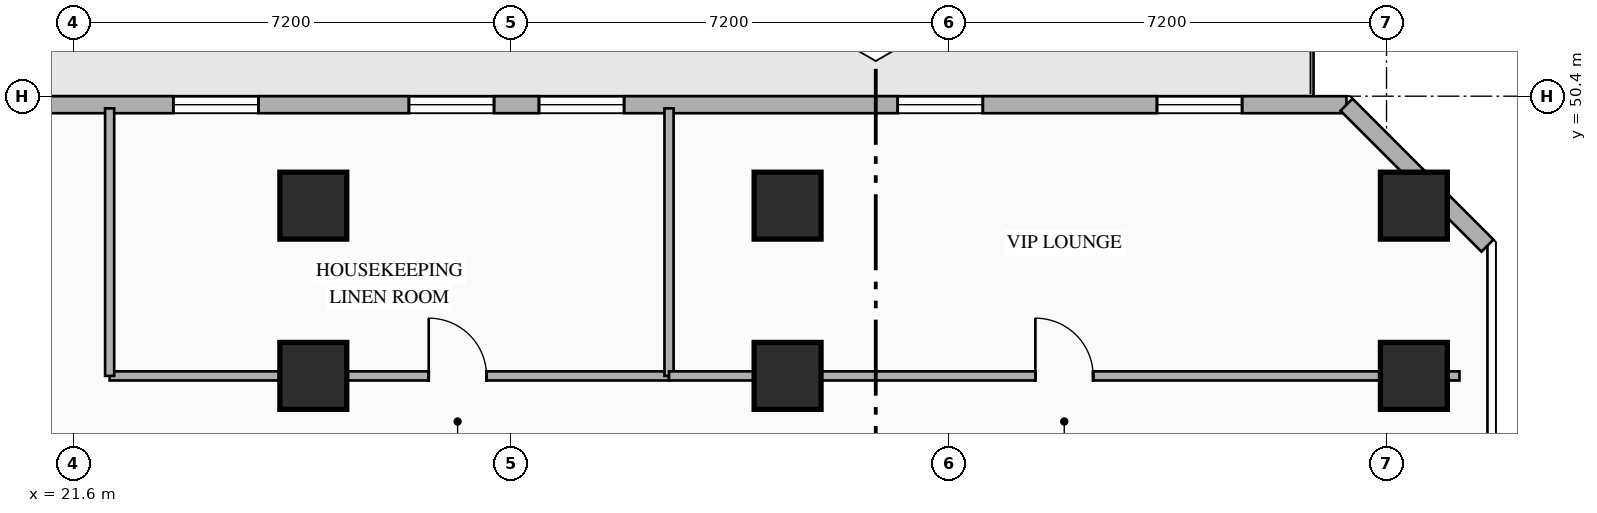
"""IFC4 building model, lengths in metres.
Left out: names, types, materials, properties, quantities, classifications, styles, units other than length and angle.
Written with IfcOpenShell. Run it as: python <this file> out.ifc"""

import sys

from ifc_helpers import new_model, si_unit, direction, frame, frame_2d, origin, origin_2d, place, context, subcontext, project, spatial, rectangle, hollow_rectangle, extrude, element, fill, save


model = new_model("IFC4")
c1 = context("Model", 3, precision=1e-05, world=origin(), true_north=direction((0.0, 1.0)))
c2 = subcontext(c1, "Body", "Model", "MODEL_VIEW")
j1 = project(units=[si_unit("LENGTHUNIT", "METRE"), si_unit("PLANEANGLEUNIT", "RADIAN")], contexts=[c1])
p1 = place(None, origin())
s1 = spatial("IfcSite", under=j1, at=p1, CompositionType="ELEMENT")
p2 = place(p1, origin())
s2 = spatial("IfcBuilding", under=s1, at=p2, CompositionType="ELEMENT")
p3 = place(p2, frame((0.0, 0.0, 60.05)))
s3 = spatial("IfcBuildingStorey", under=s2, at=p3, CompositionType="ELEMENT", Elevation=60.05)
for number, where, z_axis, x_axis in (
    (1, (25.55, 45.8, 0.0), (0.0, 0.0, 1.0), (1.0, 0.0, 0.0)),
    (2, (33.35, 45.8, 0.0), (0.0, 0.0, 1.0), (1.0, 0.0, 0.0)),
    (3, (43.65, 45.8, 0.0), (0.0, 0.0, 1.0), (1.0, 0.0, 0.0)),
    (4, (25.55, 48.6, 0.0), (0.0, 0.0, 1.0), (1.0, 0.0, 0.0)),
    (5, (33.35, 48.6, 0.0), (0.0, 0.0, 1.0), (1.0, 0.0, 0.0)),
    (6, (43.65, 48.6, 0.0), (0.0, 0.0, 1.0), (1.0, 0.0, 0.0)),
):
    element("IfcColumn", number, at=place(p3, frame(where, z_axis=z_axis, x_axis=x_axis)), inside=s3, PredefinedType="COLUMN", context=c2, shape_type="SweptSolid", body=[
        extrude(hollow_rectangle(XDim=1.1, YDim=1.1, WallThickness=0.04, at=origin_2d()), origin(), (0.0, 0.0, 1.0), 3.35),
    ])
p4 = place(p3, frame((2.458, 50.26, 0.0), z_axis=(0.0, 0.0, 1.0), x_axis=(1.0, 0.0, 0.0)))
e7 = element("IfcWall", 7, at=p4, inside=s3, PredefinedType="STANDARD", context=c2, shape_type="SweptSolid", body=[
    extrude(rectangle(XDim=40.084, YDim=0.28, at=frame_2d((20.042, 0.0))), origin(), (0.0, 0.0, 1.0), 3.13),
])
p5 = place(p4, frame((4.26, 0.0, 0.0)))
e8 = element("IfcOpeningElement", 8, at=p5, cuts=e7, PredefinedType="OPENING", context=c2, shape_type="SweptSolid", body=[
    extrude(rectangle(XDim=1.1, YDim=2.2, at=frame_2d((0.55, 1.1))), frame((0.0, 0.15, 0.0), z_axis=(0.0, -1.0, 0.0), x_axis=(1.0, 0.0, 0.0)), (0.0, 0.0, 1.0), 0.3),
])
p6 = place(p4, frame((0.46, 0.0, 0.85)))
e9 = element("IfcOpeningElement", 9, at=p6, cuts=e7, PredefinedType="OPENING", context=c2, shape_type="SweptSolid", body=[
    extrude(rectangle(XDim=1.4, YDim=1.8, at=frame_2d((0.7, 0.9))), frame((0.0, 0.15, 0.0), z_axis=(0.0, -1.0, 0.0), x_axis=(1.0, 0.0, 0.0)), (0.0, 0.0, 1.0), 0.3),
])
p7 = place(p4, frame((10.0, 0.0, 0.85)))
e10 = element("IfcOpeningElement", 10, at=p7, cuts=e7, PredefinedType="OPENING", context=c2, shape_type="SweptSolid", body=[
    extrude(rectangle(XDim=1.4, YDim=1.8, at=frame_2d((0.7, 0.9))), frame((0.0, 0.15, 0.0), z_axis=(0.0, -1.0, 0.0), x_axis=(1.0, 0.0, 0.0)), (0.0, 0.0, 1.0), 0.3),
])
p8 = place(p4, frame((14.02, 0.0, 0.85)))
e11 = element("IfcOpeningElement", 11, at=p8, cuts=e7, PredefinedType="OPENING", context=c2, shape_type="SweptSolid", body=[
    extrude(rectangle(XDim=1.4, YDim=1.8, at=frame_2d((0.7, 0.9))), frame((0.0, 0.15, 0.0), z_axis=(0.0, -1.0, 0.0), x_axis=(1.0, 0.0, 0.0)), (0.0, 0.0, 1.0), 0.3),
])
p9 = place(p4, frame((20.789, 0.0, 0.85)))
e12 = element("IfcOpeningElement", 12, at=p9, cuts=e7, PredefinedType="OPENING", context=c2, shape_type="SweptSolid", body=[
    extrude(rectangle(XDim=1.4, YDim=1.8, at=frame_2d((0.7, 0.9))), frame((0.0, 0.15, 0.0), z_axis=(0.0, -1.0, 0.0), x_axis=(1.0, 0.0, 0.0)), (0.0, 0.0, 1.0), 0.3),
])
p10 = place(p4, frame((24.664, 0.0, 0.85)))
e13 = element("IfcOpeningElement", 13, at=p10, cuts=e7, PredefinedType="OPENING", context=c2, shape_type="SweptSolid", body=[
    extrude(rectangle(XDim=1.4, YDim=1.8, at=frame_2d((0.7, 0.9))), frame((0.0, 0.15, 0.0), z_axis=(0.0, -1.0, 0.0), x_axis=(1.0, 0.0, 0.0)), (0.0, 0.0, 1.0), 0.3),
])
p11 = place(p4, frame((26.803, 0.0, 0.85)))
e14 = element("IfcOpeningElement", 14, at=p11, cuts=e7, PredefinedType="OPENING", context=c2, shape_type="SweptSolid", body=[
    extrude(rectangle(XDim=1.4, YDim=1.8, at=frame_2d((0.7, 0.9))), frame((0.0, 0.15, 0.0), z_axis=(0.0, -1.0, 0.0), x_axis=(1.0, 0.0, 0.0)), (0.0, 0.0, 1.0), 0.3),
])
p12 = place(p4, frame((32.703, 0.0, 0.85)))
e15 = element("IfcOpeningElement", 15, at=p12, cuts=e7, PredefinedType="OPENING", context=c2, shape_type="SweptSolid", body=[
    extrude(rectangle(XDim=1.4, YDim=1.8, at=frame_2d((0.7, 0.9))), frame((0.0, 0.15, 0.0), z_axis=(0.0, -1.0, 0.0), x_axis=(1.0, 0.0, 0.0)), (0.0, 0.0, 1.0), 0.3),
])
p13 = place(p4, frame((36.967, 0.0, 0.85)))
e16 = element("IfcOpeningElement", 16, at=p13, cuts=e7, PredefinedType="OPENING", context=c2, shape_type="SweptSolid", body=[
    extrude(rectangle(XDim=1.4, YDim=1.8, at=frame_2d((0.7, 0.9))), frame((0.0, 0.15, 0.0), z_axis=(0.0, -1.0, 0.0), x_axis=(1.0, 0.0, 0.0)), (0.0, 0.0, 1.0), 0.3),
])
p14 = place(p3, frame((42.542, 50.26, 0.0), z_axis=(0.0, 0.0, 1.0), x_axis=(0.707106781187, -0.707106781187, 0.0)))
e17 = element("IfcWall", 17, at=p14, inside=s3, PredefinedType="STANDARD", context=c2, shape_type="SweptSolid", body=[
    extrude(rectangle(XDim=3.278, YDim=0.28, at=frame_2d((1.639, 0.0))), origin(), (0.0, 0.0, 1.0), 3.13),
])
p15 = place(p3, frame((22.2, 45.8, 0.0), z_axis=(0.0, 0.0, 1.0), x_axis=(1.0, 0.0, 0.0)))
e18 = element("IfcWall", 18, at=p15, inside=s3, PredefinedType="PARTITIONING", context=c2, shape_type="SweptSolid", body=[
    extrude(rectangle(XDim=9.2, YDim=0.15, at=frame_2d((4.6, 0.0))), origin(), (0.0, 0.0, 1.0), 2.425),
])
p16 = place(p15, frame((5.248, 0.0, 0.0)))
e19 = element("IfcOpeningElement", 19, at=p16, cuts=e18, PredefinedType="OPENING", context=c2, shape_type="SweptSolid", body=[
    extrude(rectangle(XDim=0.95, YDim=2.15, at=frame_2d((0.475, 1.075))), frame((0.0, 0.085, 0.0), z_axis=(0.0, -1.0, 0.0), x_axis=(1.0, 0.0, 0.0)), (0.0, 0.0, 1.0), 0.17),
])
for number, where, z_axis, x_axis in (
    (20, (22.2, 45.8, 0.0), (0.0, 0.0, 1.0), (0.0, 1.0, 0.0)),
    (21, (31.4, 45.8, 0.0), (0.0, 0.0, 1.0), (0.0, 1.0, 0.0)),
):
    element("IfcWall", number, at=place(p3, frame(where, z_axis=z_axis, x_axis=x_axis)), inside=s3, PredefinedType="PARTITIONING", context=c2, shape_type="SweptSolid", body=[
        extrude(rectangle(XDim=4.4, YDim=0.15, at=frame_2d((2.2, 0.0))), origin(), (0.0, 0.0, 1.0), 3.13),
    ])
p17 = place(p3, frame((31.4, 45.8, 0.0), z_axis=(0.0, 0.0, 1.0), x_axis=(1.0, 0.0, 0.0)))
e22 = element("IfcWall", 22, at=p17, inside=s3, PredefinedType="PARTITIONING", context=c2, shape_type="SweptSolid", body=[
    extrude(rectangle(XDim=13.0, YDim=0.15, at=frame_2d((6.5, 0.0))), origin(), (0.0, 0.0, 1.0), 2.425),
])
p18 = place(p17, frame((6.025, 0.0, 0.0)))
e23 = element("IfcOpeningElement", 23, at=p18, cuts=e22, PredefinedType="OPENING", context=c2, shape_type="SweptSolid", body=[
    extrude(rectangle(XDim=0.95, YDim=2.15, at=frame_2d((0.475, 1.075))), frame((0.0, 0.085, 0.0), z_axis=(0.0, -1.0, 0.0), x_axis=(1.0, 0.0, 0.0)), (0.0, 0.0, 1.0), 0.17),
])
p19 = place(p9, origin())
e24 = element("IfcWindow", 24, at=p19, inside=s3, PartitioningType="SINGLE_PANEL", PredefinedType="WINDOW", context=c2, shape_type="SweptSolid", body=[
    extrude(rectangle(XDim=1.4, YDim=1.8, at=frame_2d((0.7, 0.9))), frame((0.0, 0.03, 0.0), z_axis=(0.0, -1.0, 0.0), x_axis=(1.0, 0.0, 0.0)), (0.0, 0.0, 1.0), 0.06),
])
fill(e12, e24)
p20 = place(p10, origin())
e25 = element("IfcWindow", 25, at=p20, inside=s3, PartitioningType="SINGLE_PANEL", PredefinedType="WINDOW", context=c2, shape_type="SweptSolid", body=[
    extrude(rectangle(XDim=1.4, YDim=1.8, at=frame_2d((0.7, 0.9))), frame((0.0, 0.03, 0.0), z_axis=(0.0, -1.0, 0.0), x_axis=(1.0, 0.0, 0.0)), (0.0, 0.0, 1.0), 0.06),
])
fill(e13, e25)
p21 = place(p11, origin())
e26 = element("IfcWindow", 26, at=p21, inside=s3, PartitioningType="SINGLE_PANEL", PredefinedType="WINDOW", context=c2, shape_type="SweptSolid", body=[
    extrude(rectangle(XDim=1.4, YDim=1.8, at=frame_2d((0.7, 0.9))), frame((0.0, 0.03, 0.0), z_axis=(0.0, -1.0, 0.0), x_axis=(1.0, 0.0, 0.0)), (0.0, 0.0, 1.0), 0.06),
])
fill(e14, e26)
p22 = place(p12, origin())
e27 = element("IfcWindow", 27, at=p22, inside=s3, PartitioningType="SINGLE_PANEL", PredefinedType="WINDOW", context=c2, shape_type="SweptSolid", body=[
    extrude(rectangle(XDim=1.4, YDim=1.8, at=frame_2d((0.7, 0.9))), frame((0.0, 0.03, 0.0), z_axis=(0.0, -1.0, 0.0), x_axis=(1.0, 0.0, 0.0)), (0.0, 0.0, 1.0), 0.06),
])
fill(e15, e27)
p23 = place(p13, origin())
e28 = element("IfcWindow", 28, at=p23, inside=s3, PartitioningType="SINGLE_PANEL", PredefinedType="WINDOW", context=c2, shape_type="SweptSolid", body=[
    extrude(rectangle(XDim=1.4, YDim=1.8, at=frame_2d((0.7, 0.9))), frame((0.0, 0.03, 0.0), z_axis=(0.0, -1.0, 0.0), x_axis=(1.0, 0.0, 0.0)), (0.0, 0.0, 1.0), 0.06),
])
fill(e16, e28)
p24 = place(p16, origin())
e29 = element("IfcDoor", 29, at=p24, inside=s3, OperationType="SINGLE_SWING_LEFT", PredefinedType="DOOR", context=c2, shape_type="SweptSolid", body=[
    extrude(rectangle(XDim=0.95, YDim=2.15, at=frame_2d((0.475, 1.075))), frame((0.0, 0.025, 0.0), z_axis=(0.0, -1.0, 0.0), x_axis=(1.0, 0.0, 0.0)), (0.0, 0.0, 1.0), 0.05),
])
fill(e19, e29)
p25 = place(p18, origin())
e30 = element("IfcDoor", 30, at=p25, inside=s3, OperationType="SINGLE_SWING_LEFT", PredefinedType="DOOR", context=c2, shape_type="SweptSolid", body=[
    extrude(rectangle(XDim=0.95, YDim=2.15, at=frame_2d((0.475, 1.075))), frame((0.0, 0.025, 0.0), z_axis=(0.0, -1.0, 0.0), x_axis=(1.0, 0.0, 0.0)), (0.0, 0.0, 1.0), 0.05),
])
fill(e23, e30)
save(model, sys.argv[1])
